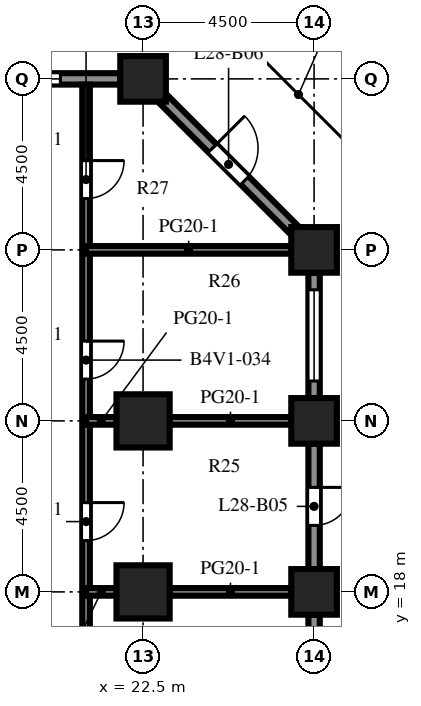
"""IFC4 building model, lengths in metres.
Left out: names, types, materials, properties, quantities, classifications, styles, units other than length and angle.
Written with IfcOpenShell. Run it as: python <this file> out.ifc"""

import sys

from ifc_helpers import new_model, si_unit, direction, frame, frame_2d, origin, origin_2d, place, context, subcontext, project, spatial, rectangle, extrude, element, fill, save


model = new_model("IFC4")
c1 = context("Model", 3, precision=1e-05, world=origin(), true_north=direction((0.0, 1.0)))
c2 = subcontext(c1, "Body", "Model", "MODEL_VIEW")
j1 = project(units=[si_unit("LENGTHUNIT", "METRE"), si_unit("PLANEANGLEUNIT", "RADIAN")], contexts=[c1])
p1 = place(None, origin())
s1 = spatial("IfcSite", under=j1, at=p1, CompositionType="ELEMENT")
p2 = place(p1, origin())
s2 = spatial("IfcBuilding", under=s1, at=p2, CompositionType="ELEMENT")
p3 = place(p2, frame((0.0, 0.0, 124.9)))
s3 = spatial("IfcBuildingStorey", under=s2, at=p3, CompositionType="ELEMENT", Elevation=124.9)
for number, where, z_axis, x_axis in (
    (1, (22.5, 31.5, 0.0), (0.0, 0.0, 1.0), (1.0, 0.0, 0.0)),
    (2, (27.0, 18.0, 0.0), (0.0, 0.0, 1.0), (1.0, 0.0, 0.0)),
    (3, (27.0, 22.5, 0.0), (0.0, 0.0, 1.0), (1.0, 0.0, 0.0)),
    (4, (27.0, 27.0, 0.0), (0.0, 0.0, 1.0), (1.0, 0.0, 0.0)),
):
    element("IfcColumn", number, at=place(p3, frame(where, z_axis=z_axis, x_axis=x_axis)), inside=s3, PredefinedType="COLUMN", context=c2, shape_type="SweptSolid", body=[
        extrude(rectangle(XDim=1.2, YDim=1.2, at=origin_2d()), origin(), (0.0, 0.0, 1.0), 4.1),
    ])
for number, where, z_axis, x_axis in (
    (5, (22.5, 18.0, 0.0), (0.0, 0.0, 1.0), (1.0, 0.0, 0.0)),
    (6, (22.5, 22.5, 0.0), (0.0, 0.0, 1.0), (1.0, 0.0, 0.0)),
):
    element("IfcColumn", number, at=place(p3, frame(where, z_axis=z_axis, x_axis=x_axis)), inside=s3, PredefinedType="COLUMN", context=c2, shape_type="SweptSolid", body=[
        extrude(rectangle(XDim=1.4, YDim=1.4, at=origin_2d()), origin(), (0.0, 0.0, 1.0), 4.1),
    ])
p4 = place(p3, frame((27.0, 17.4, 0.0), z_axis=(0.0, 0.0, 1.0), x_axis=(0.0, -1.0, 0.0)))
e7 = element("IfcWall", 7, at=p4, inside=s3, PredefinedType="SOLIDWALL", context=c2, shape_type="SweptSolid", body=[
    extrude(rectangle(XDim=3.3, YDim=0.3, at=frame_2d((1.65, 0.0))), origin(), (0.0, 0.0, 1.0), 2.75),
])
p5 = place(p4, frame((0.45, 0.0, 0.8)))
e8 = element("IfcOpeningElement", 8, at=p5, cuts=e7, PredefinedType="OPENING", context=c2, shape_type="SweptSolid", body=[
    extrude(rectangle(XDim=2.4, YDim=1.7, at=frame_2d((1.2, 0.85))), frame((0.0, 0.16, 0.0), z_axis=(0.0, -1.0, 0.0), x_axis=(1.0, 0.0, 0.0)), (0.0, 0.0, 1.0), 0.32),
])
p6 = place(p3, frame((27.0, 21.9, 0.0), z_axis=(0.0, 0.0, 1.0), x_axis=(0.0, -1.0, 0.0)))
e9 = element("IfcWall", 9, at=p6, inside=s3, PredefinedType="SOLIDWALL", context=c2, shape_type="SweptSolid", body=[
    extrude(rectangle(XDim=3.3, YDim=0.3, at=frame_2d((1.65, 0.0))), origin(), (0.0, 0.0, 1.0), 2.75),
])
p7 = place(p6, frame((1.15, 0.0, 0.0)))
e10 = element("IfcOpeningElement", 10, at=p7, cuts=e9, PredefinedType="OPENING", context=c2, shape_type="SweptSolid", body=[
    extrude(rectangle(XDim=1.0, YDim=2.2, at=frame_2d((0.5, 1.1))), frame((0.0, 0.16, 0.0), z_axis=(0.0, -1.0, 0.0), x_axis=(1.0, 0.0, 0.0)), (0.0, 0.0, 1.0), 0.32),
])
p8 = place(p3, frame((27.0, 26.4, 0.0), z_axis=(0.0, 0.0, 1.0), x_axis=(0.0, -1.0, 0.0)))
e11 = element("IfcWall", 11, at=p8, inside=s3, PredefinedType="SOLIDWALL", context=c2, shape_type="SweptSolid", body=[
    extrude(rectangle(XDim=3.3, YDim=0.3, at=frame_2d((1.65, 0.0))), origin(), (0.0, 0.0, 1.0), 2.75),
])
p9 = place(p8, frame((0.45, 0.0, 0.8)))
e12 = element("IfcOpeningElement", 12, at=p9, cuts=e11, PredefinedType="OPENING", context=c2, shape_type="SweptSolid", body=[
    extrude(rectangle(XDim=2.4, YDim=1.7, at=frame_2d((1.2, 0.85))), frame((0.0, 0.16, 0.0), z_axis=(0.0, -1.0, 0.0), x_axis=(1.0, 0.0, 0.0)), (0.0, 0.0, 1.0), 0.32),
])
p10 = place(p3, frame((22.994, 31.006, 0.0), z_axis=(0.0, 0.0, 1.0), x_axis=(0.707106781187, -0.707106781187, 0.0)))
e13 = element("IfcWall", 13, at=p10, inside=s3, PredefinedType="SOLIDWALL", context=c2, shape_type="SweptSolid", body=[
    extrude(rectangle(XDim=4.967, YDim=0.3, at=frame_2d((2.483, 0.0))), origin(), (0.0, 0.0, 1.0), 2.75),
])
p11 = place(p10, frame((1.884, 0.0, 0.0)))
e14 = element("IfcOpeningElement", 14, at=p11, cuts=e13, PredefinedType="OPENING", context=c2, shape_type="SweptSolid", body=[
    extrude(rectangle(XDim=1.2, YDim=2.2, at=frame_2d((0.6, 1.1))), frame((0.0, 0.16, 0.0), z_axis=(0.0, -1.0, 0.0), x_axis=(1.0, 0.0, 0.0)), (0.0, 0.0, 1.0), 0.32),
])
p12 = place(p3, frame((18.6, 31.5, 0.0), z_axis=(0.0, 0.0, 1.0), x_axis=(1.0, 0.0, 0.0)))
e15 = element("IfcWall", 15, at=p12, inside=s3, PredefinedType="SOLIDWALL", context=c2, shape_type="SweptSolid", body=[
    extrude(rectangle(XDim=3.3, YDim=0.3, at=frame_2d((1.65, 0.0))), origin(), (0.0, 0.0, 1.0), 2.75),
])
p13 = place(p12, frame((0.525, 0.0, 0.8)))
e16 = element("IfcOpeningElement", 16, at=p13, cuts=e15, PredefinedType="OPENING", context=c2, shape_type="SweptSolid", body=[
    extrude(rectangle(XDim=1.2, YDim=1.7, at=frame_2d((0.6, 0.85))), frame((0.0, 0.16, 0.0), z_axis=(0.0, -1.0, 0.0), x_axis=(1.0, 0.0, 0.0)), (0.0, 0.0, 1.0), 0.32),
])
p14 = place(p3, frame((21.0, 31.35, 0.0), z_axis=(0.0, 0.0, 1.0), x_axis=(0.0, -1.0, 0.0)))
e17 = element("IfcWall", 17, at=p14, inside=s3, PredefinedType="PARTITIONING", context=c2, shape_type="SweptSolid", body=[
    extrude(rectangle(XDim=53.7, YDim=0.2, at=frame_2d((26.85, 0.0))), origin(), (0.0, 0.0, 1.0), 3.65),
])
p15 = place(p14, frame((47.5, 0.0, 0.0)))
e18 = element("IfcOpeningElement", 18, at=p15, cuts=e17, PredefinedType="OPENING", context=c2, shape_type="SweptSolid", body=[
    extrude(rectangle(XDim=1.0, YDim=2.1, at=frame_2d((0.5, 1.05))), frame((0.0, 0.11, 0.0), z_axis=(0.0, -1.0, 0.0), x_axis=(1.0, 0.0, 0.0)), (0.0, 0.0, 1.0), 0.22),
])
p16 = place(p14, frame((41.5, 0.0, 0.0)))
e19 = element("IfcOpeningElement", 19, at=p16, cuts=e17, PredefinedType="OPENING", context=c2, shape_type="SweptSolid", body=[
    extrude(rectangle(XDim=1.0, YDim=2.1, at=frame_2d((0.5, 1.05))), frame((0.0, 0.11, 0.0), z_axis=(0.0, -1.0, 0.0), x_axis=(1.0, 0.0, 0.0)), (0.0, 0.0, 1.0), 0.22),
])
p17 = place(p14, frame((33.5, 0.0, 0.0)))
e20 = element("IfcOpeningElement", 20, at=p17, cuts=e17, PredefinedType="OPENING", context=c2, shape_type="SweptSolid", body=[
    extrude(rectangle(XDim=1.0, YDim=2.1, at=frame_2d((0.5, 1.05))), frame((0.0, 0.11, 0.0), z_axis=(0.0, -1.0, 0.0), x_axis=(1.0, 0.0, 0.0)), (0.0, 0.0, 1.0), 0.22),
])
p18 = place(p14, frame((23.75, 0.0, 0.0)))
e21 = element("IfcOpeningElement", 21, at=p18, cuts=e17, PredefinedType="OPENING", context=c2, shape_type="SweptSolid", body=[
    extrude(rectangle(XDim=1.0, YDim=2.1, at=frame_2d((0.5, 1.05))), frame((0.0, 0.11, 0.0), z_axis=(0.0, -1.0, 0.0), x_axis=(1.0, 0.0, 0.0)), (0.0, 0.0, 1.0), 0.22),
])
p19 = place(p14, frame((16.25, 0.0, 0.0)))
e22 = element("IfcOpeningElement", 22, at=p19, cuts=e17, PredefinedType="OPENING", context=c2, shape_type="SweptSolid", body=[
    extrude(rectangle(XDim=1.0, YDim=2.1, at=frame_2d((0.5, 1.05))), frame((0.0, 0.11, 0.0), z_axis=(0.0, -1.0, 0.0), x_axis=(1.0, 0.0, 0.0)), (0.0, 0.0, 1.0), 0.22),
])
p20 = place(p14, frame((11.0, 0.0, 0.0)))
e23 = element("IfcOpeningElement", 23, at=p20, cuts=e17, PredefinedType="OPENING", context=c2, shape_type="SweptSolid", body=[
    extrude(rectangle(XDim=1.0, YDim=2.1, at=frame_2d((0.5, 1.05))), frame((0.0, 0.11, 0.0), z_axis=(0.0, -1.0, 0.0), x_axis=(1.0, 0.0, 0.0)), (0.0, 0.0, 1.0), 0.22),
])
p21 = place(p14, frame((6.75, 0.0, 0.0)))
e24 = element("IfcOpeningElement", 24, at=p21, cuts=e17, PredefinedType="OPENING", context=c2, shape_type="SweptSolid", body=[
    extrude(rectangle(XDim=1.0, YDim=2.1, at=frame_2d((0.5, 1.05))), frame((0.0, 0.11, 0.0), z_axis=(0.0, -1.0, 0.0), x_axis=(1.0, 0.0, 0.0)), (0.0, 0.0, 1.0), 0.22),
])
p22 = place(p14, frame((2.0, 0.0, 0.0)))
e25 = element("IfcOpeningElement", 25, at=p22, cuts=e17, PredefinedType="OPENING", context=c2, shape_type="SweptSolid", body=[
    extrude(rectangle(XDim=1.0, YDim=2.1, at=frame_2d((0.5, 1.05))), frame((0.0, 0.11, 0.0), z_axis=(0.0, -1.0, 0.0), x_axis=(1.0, 0.0, 0.0)), (0.0, 0.0, 1.0), 0.22),
])
p23 = place(p3, frame((21.0, 18.0, 0.0), z_axis=(0.0, 0.0, 1.0), x_axis=(1.0, 0.0, 0.0)))
e26 = element("IfcWall", 26, at=p23, inside=s3, PredefinedType="PARTITIONING", context=c2, shape_type="SweptSolid", body=[
    extrude(rectangle(XDim=0.8, YDim=0.2, at=frame_2d((0.4, 0.0))), origin(), (0.0, 0.0, 1.0), 3.65),
])
p24 = place(p3, frame((23.2, 18.0, 0.0), z_axis=(0.0, 0.0, 1.0), x_axis=(1.0, 0.0, 0.0)))
e27 = element("IfcWall", 27, at=p24, inside=s3, PredefinedType="PARTITIONING", context=c2, shape_type="SweptSolid", body=[
    extrude(rectangle(XDim=3.2, YDim=0.2, at=frame_2d((1.6, 0.0))), origin(), (0.0, 0.0, 1.0), 3.65),
])
p25 = place(p3, frame((21.0, 22.5, 0.0), z_axis=(0.0, 0.0, 1.0), x_axis=(1.0, 0.0, 0.0)))
e28 = element("IfcWall", 28, at=p25, inside=s3, PredefinedType="PARTITIONING", context=c2, shape_type="SweptSolid", body=[
    extrude(rectangle(XDim=0.8, YDim=0.2, at=frame_2d((0.4, 0.0))), origin(), (0.0, 0.0, 1.0), 3.65),
])
p26 = place(p3, frame((23.2, 22.5, 0.0), z_axis=(0.0, 0.0, 1.0), x_axis=(1.0, 0.0, 0.0)))
e29 = element("IfcWall", 29, at=p26, inside=s3, PredefinedType="PARTITIONING", context=c2, shape_type="SweptSolid", body=[
    extrude(rectangle(XDim=3.2, YDim=0.2, at=frame_2d((1.6, 0.0))), origin(), (0.0, 0.0, 1.0), 3.65),
])
p27 = place(p3, frame((21.0, 27.0, 0.0), z_axis=(0.0, 0.0, 1.0), x_axis=(1.0, 0.0, 0.0)))
e30 = element("IfcWall", 30, at=p27, inside=s3, PredefinedType="PARTITIONING", context=c2, shape_type="SweptSolid", body=[
    extrude(rectangle(XDim=5.4, YDim=0.2, at=frame_2d((2.7, 0.0))), origin(), (0.0, 0.0, 1.0), 3.65),
])
p28 = place(p7, origin())
e31 = element("IfcDoor", 31, at=p28, inside=s3, OperationType="SINGLE_SWING_LEFT", PredefinedType="DOOR", context=c2, shape_type="SweptSolid", body=[
    extrude(rectangle(XDim=1.0, YDim=2.2, at=frame_2d((0.5, 1.1))), frame((0.0, 0.025, 0.0), z_axis=(0.0, -1.0, 0.0), x_axis=(1.0, 0.0, 0.0)), (0.0, 0.0, 1.0), 0.05),
])
fill(e10, e31)
p29 = place(p9, origin())
e32 = element("IfcWindow", 32, at=p29, inside=s3, PartitioningType="SINGLE_PANEL", PredefinedType="WINDOW", context=c2, shape_type="SweptSolid", body=[
    extrude(rectangle(XDim=2.4, YDim=1.7, at=frame_2d((1.2, 0.85))), frame((0.0, 0.03, 0.0), z_axis=(0.0, -1.0, 0.0), x_axis=(1.0, 0.0, 0.0)), (0.0, 0.0, 1.0), 0.06),
])
fill(e12, e32)
p30 = place(p11, origin())
e33 = element("IfcDoor", 33, at=p30, inside=s3, OperationType="SINGLE_SWING_LEFT", PredefinedType="DOOR", context=c2, shape_type="SweptSolid", body=[
    extrude(rectangle(XDim=1.2, YDim=2.2, at=frame_2d((0.6, 1.1))), frame((0.0, 0.025, 0.0), z_axis=(0.0, -1.0, 0.0), x_axis=(1.0, 0.0, 0.0)), (0.0, 0.0, 1.0), 0.05),
])
fill(e14, e33)
p31 = place(p13, origin())
e34 = element("IfcWindow", 34, at=p31, inside=s3, PartitioningType="SINGLE_PANEL", PredefinedType="WINDOW", context=c2, shape_type="SweptSolid", body=[
    extrude(rectangle(XDim=1.2, YDim=1.7, at=frame_2d((0.6, 0.85))), frame((0.0, 0.03, 0.0), z_axis=(0.0, -1.0, 0.0), x_axis=(1.0, 0.0, 0.0)), (0.0, 0.0, 1.0), 0.06),
])
fill(e16, e34)
p32 = place(p20, origin())
e35 = element("IfcDoor", 35, at=p32, inside=s3, OperationType="SINGLE_SWING_LEFT", PredefinedType="DOOR", context=c2, shape_type="SweptSolid", body=[
    extrude(rectangle(XDim=1.0, YDim=2.1, at=frame_2d((0.5, 1.05))), frame((0.0, 0.025, 0.0), z_axis=(0.0, -1.0, 0.0), x_axis=(1.0, 0.0, 0.0)), (0.0, 0.0, 1.0), 0.05),
])
fill(e23, e35)
p33 = place(p21, origin())
e36 = element("IfcDoor", 36, at=p33, inside=s3, OperationType="SINGLE_SWING_LEFT", PredefinedType="DOOR", context=c2, shape_type="SweptSolid", body=[
    extrude(rectangle(XDim=1.0, YDim=2.1, at=frame_2d((0.5, 1.05))), frame((0.0, 0.025, 0.0), z_axis=(0.0, -1.0, 0.0), x_axis=(1.0, 0.0, 0.0)), (0.0, 0.0, 1.0), 0.05),
])
fill(e24, e36)
p34 = place(p22, origin())
e37 = element("IfcDoor", 37, at=p34, inside=s3, OperationType="SINGLE_SWING_LEFT", PredefinedType="DOOR", context=c2, shape_type="SweptSolid", body=[
    extrude(rectangle(XDim=1.0, YDim=2.1, at=frame_2d((0.5, 1.05))), frame((0.0, 0.025, 0.0), z_axis=(0.0, -1.0, 0.0), x_axis=(1.0, 0.0, 0.0)), (0.0, 0.0, 1.0), 0.05),
])
fill(e25, e37)
save(model, sys.argv[1])
